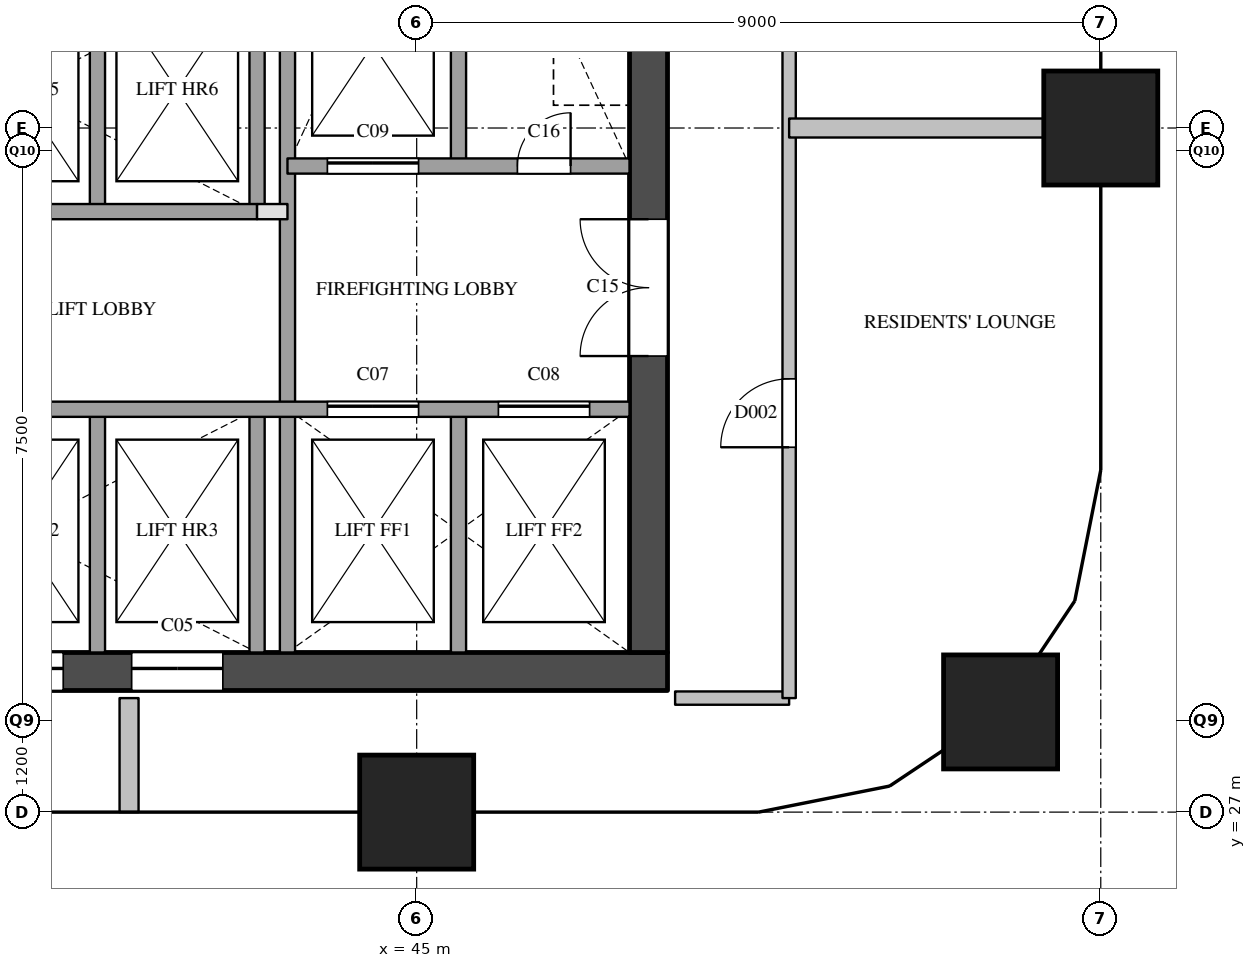
"""IFC4 building model, lengths in metres.
Left out: names, types, materials, properties, quantities, classifications, styles, units other than length and angle.
Written with IfcOpenShell. Run it as: python <this file> out.ifc"""

import sys

from ifc_helpers import new_model, si_unit, direction, frame, frame_2d, origin, origin_2d, place, context, subcontext, project, spatial, rectangle, extrude, element, fill, save


model = new_model("IFC4")
c1 = context("Model", 3, precision=1e-05, world=origin(), true_north=direction((0.0, 1.0)))
c2 = subcontext(c1, "Body", "Model", "MODEL_VIEW")
j1 = project(units=[si_unit("LENGTHUNIT", "METRE"), si_unit("PLANEANGLEUNIT", "RADIAN")], contexts=[c1])
p1 = place(None, origin())
s1 = spatial("IfcSite", under=j1, at=p1, CompositionType="ELEMENT")
p2 = place(p1, origin())
s2 = spatial("IfcBuilding", under=s1, at=p2, CompositionType="ELEMENT")
p3 = place(p2, frame((0.0, 0.0, 150.5)))
s3 = spatial("IfcBuildingStorey", under=s2, at=p3, CompositionType="ELEMENT", Elevation=150.5)
for number, where, z_axis, x_axis in (
    (1, (45.0, 27.0, 0.0), (0.0, 0.0, 1.0), (1.0, 0.0, 0.0)),
    (2, (52.682, 28.318, 0.0), (0.0, 0.0, 1.0), (1.0, 0.0, 0.0)),
    (3, (54.0, 36.0, 0.0), (0.0, 0.0, 1.0), (1.0, 0.0, 0.0)),
):
    element("IfcColumn", number, at=place(p3, frame(where, z_axis=z_axis, x_axis=x_axis)), inside=s3, PredefinedType="COLUMN", context=c2, shape_type="SweptSolid", body=[
        extrude(rectangle(XDim=1.5, YDim=1.5, at=origin_2d()), origin(), (0.0, 0.0, 1.0), 3.9),
    ])
p4 = place(p3, frame((36.1, 28.85, 0.0), z_axis=(0.0, 0.0, 1.0), x_axis=(1.0, 0.0, 0.0)))
e4 = element("IfcWall", 4, at=p4, inside=s3, PredefinedType="SHEAR", context=c2, shape_type="SweptSolid", body=[
    extrude(rectangle(XDim=12.2, YDim=0.5, at=frame_2d((6.1, 0.0))), origin(), (0.0, 0.0, 1.0), 3.6),
])
p5 = place(p4, frame((0.95, 0.0, 0.0)))
e5 = element("IfcOpeningElement", 5, at=p5, cuts=e4, PredefinedType="OPENING", context=c2, shape_type="SweptSolid", body=[
    extrude(rectangle(XDim=1.2, YDim=2.1, at=frame_2d((0.6, 1.05))), frame((0.0, 0.26, 0.0), z_axis=(0.0, -1.0, 0.0), x_axis=(1.0, 0.0, 0.0)), (0.0, 0.0, 1.0), 0.52),
])
p6 = place(p4, frame((3.05, 0.0, 0.0)))
e6 = element("IfcOpeningElement", 6, at=p6, cuts=e4, PredefinedType="OPENING", context=c2, shape_type="SweptSolid", body=[
    extrude(rectangle(XDim=1.2, YDim=2.1, at=frame_2d((0.6, 1.05))), frame((0.0, 0.26, 0.0), z_axis=(0.0, -1.0, 0.0), x_axis=(1.0, 0.0, 0.0)), (0.0, 0.0, 1.0), 0.52),
])
p7 = place(p4, frame((5.15, 0.0, 0.0)))
e7 = element("IfcOpeningElement", 7, at=p7, cuts=e4, PredefinedType="OPENING", context=c2, shape_type="SweptSolid", body=[
    extrude(rectangle(XDim=1.2, YDim=2.1, at=frame_2d((0.6, 1.05))), frame((0.0, 0.26, 0.0), z_axis=(0.0, -1.0, 0.0), x_axis=(1.0, 0.0, 0.0)), (0.0, 0.0, 1.0), 0.52),
])
p8 = place(p3, frame((48.05, 29.1, 0.0), z_axis=(0.0, 0.0, 1.0), x_axis=(0.0, 1.0, 0.0)))
e8 = element("IfcWall", 8, at=p8, inside=s3, PredefinedType="SHEAR", context=c2, shape_type="SweptSolid", body=[
    extrude(rectangle(XDim=20.3, YDim=0.5, at=frame_2d((10.15, 0.0))), origin(), (0.0, 0.0, 1.0), 3.6),
])
p9 = place(p8, frame((12.5, 0.0, 0.0)))
e9 = element("IfcOpeningElement", 9, at=p9, cuts=e8, PredefinedType="OPENING", context=c2, shape_type="SweptSolid", body=[
    extrude(rectangle(XDim=0.7, YDim=2.1, at=frame_2d((0.35, 1.05))), frame((0.0, 0.26, 0.0), z_axis=(0.0, -1.0, 0.0), x_axis=(1.0, 0.0, 0.0)), (0.0, 0.0, 1.0), 0.52),
])
p10 = place(p8, frame((3.9, 0.0, 0.0)))
e10 = element("IfcOpeningElement", 10, at=p10, cuts=e8, PredefinedType="OPENING", context=c2, shape_type="SweptSolid", body=[
    extrude(rectangle(XDim=1.8, YDim=2.1, at=frame_2d((0.9, 1.05))), frame((0.0, 0.26, 0.0), z_axis=(0.0, -1.0, 0.0), x_axis=(1.0, 0.0, 0.0)), (0.0, 0.0, 1.0), 0.52),
])
p11 = place(p3, frame((40.8, 29.1, 0.0), z_axis=(0.0, 0.0, 1.0), x_axis=(0.0, 1.0, 0.0)))
e11 = element("IfcWall", 11, at=p11, inside=s3, PredefinedType="SOLIDWALL", context=c2, shape_type="SweptSolid", body=[
    extrude(rectangle(XDim=3.2, YDim=0.2, at=frame_2d((1.6, 0.0))), origin(), (0.0, 0.0, 1.0), 3.6),
])
p12 = place(p3, frame((40.8, 34.9, 0.0), z_axis=(0.0, 0.0, 1.0), x_axis=(0.0, 1.0, 0.0)))
e12 = element("IfcWall", 12, at=p12, inside=s3, PredefinedType="SOLIDWALL", context=c2, shape_type="SweptSolid", body=[
    extrude(rectangle(XDim=3.2, YDim=0.2, at=frame_2d((1.6, 0.0))), origin(), (0.0, 0.0, 1.0), 3.6),
])
p13 = place(p3, frame((42.9, 29.1, 0.0), z_axis=(0.0, 0.0, 1.0), x_axis=(0.0, 1.0, 0.0)))
e13 = element("IfcWall", 13, at=p13, inside=s3, PredefinedType="SOLIDWALL", context=c2, shape_type="SweptSolid", body=[
    extrude(rectangle(XDim=3.2, YDim=0.2, at=frame_2d((1.6, 0.0))), origin(), (0.0, 0.0, 1.0), 3.6),
])
p14 = place(p3, frame((42.9, 34.9, 0.0), z_axis=(0.0, 0.0, 1.0), x_axis=(0.0, 1.0, 0.0)))
e14 = element("IfcWall", 14, at=p14, inside=s3, PredefinedType="SOLIDWALL", context=c2, shape_type="SweptSolid", body=[
    extrude(rectangle(XDim=3.2, YDim=0.2, at=frame_2d((1.6, 0.0))), origin(), (0.0, 0.0, 1.0), 3.6),
])
p15 = place(p3, frame((43.3, 29.1, 0.0), z_axis=(0.0, 0.0, 1.0), x_axis=(0.0, 1.0, 0.0)))
e15 = element("IfcWall", 15, at=p15, inside=s3, PredefinedType="SOLIDWALL", context=c2, shape_type="SweptSolid", body=[
    extrude(rectangle(XDim=9.9, YDim=0.2, at=frame_2d((4.95, 0.0))), origin(), (0.0, 0.0, 1.0), 3.6),
])
for number, where, z_axis, x_axis in (
    (16, (45.55, 29.1, 0.0), (0.0, 0.0, 1.0), (0.0, 1.0, 0.0)),
    (17, (45.55, 35.5, 0.0), (0.0, 0.0, 1.0), (0.0, 1.0, 0.0)),
):
    element("IfcWall", number, at=place(p3, frame(where, z_axis=z_axis, x_axis=x_axis)), inside=s3, PredefinedType="SOLIDWALL", context=c2, shape_type="SweptSolid", body=[
        extrude(rectangle(XDim=3.2, YDim=0.2, at=frame_2d((1.6, 0.0))), origin(), (0.0, 0.0, 1.0), 3.6),
    ])
p16 = place(p3, frame((36.6, 32.3, 0.0), z_axis=(0.0, 0.0, 1.0), x_axis=(1.0, 0.0, 0.0)))
e18 = element("IfcWall", 18, at=p16, inside=s3, PredefinedType="SOLIDWALL", context=c2, shape_type="SweptSolid", body=[
    extrude(rectangle(XDim=11.2, YDim=0.2, at=frame_2d((5.6, 0.0))), origin(), (0.0, 0.0, 1.0), 3.6),
])
p17 = place(p16, frame((7.225, 0.0, 0.0)))
e19 = element("IfcOpeningElement", 19, at=p17, cuts=e18, PredefinedType="OPENING", context=c2, shape_type="SweptSolid", body=[
    extrude(rectangle(XDim=1.2, YDim=2.1, at=frame_2d((0.6, 1.05))), frame((0.0, 0.11, 0.0), z_axis=(0.0, -1.0, 0.0), x_axis=(1.0, 0.0, 0.0)), (0.0, 0.0, 1.0), 0.22),
])
p18 = place(p16, frame((9.475, 0.0, 0.0)))
e20 = element("IfcOpeningElement", 20, at=p18, cuts=e18, PredefinedType="OPENING", context=c2, shape_type="SweptSolid", body=[
    extrude(rectangle(XDim=1.2, YDim=2.1, at=frame_2d((0.6, 1.05))), frame((0.0, 0.11, 0.0), z_axis=(0.0, -1.0, 0.0), x_axis=(1.0, 0.0, 0.0)), (0.0, 0.0, 1.0), 0.22),
])
p19 = place(p3, frame((42.9, 34.9, 0.0), z_axis=(0.0, 0.0, 1.0), x_axis=(1.0, 0.0, 0.0)))
e21 = element("IfcWall", 21, at=p19, inside=s3, PredefinedType="PARTITIONING", context=c2, shape_type="SweptSolid", body=[
    extrude(rectangle(XDim=0.4, YDim=0.2, at=frame_2d((0.2, 0.0))), origin(), (0.0, 0.0, 1.0), 3.6),
])
p20 = place(p3, frame((36.6, 34.9, 0.0), z_axis=(0.0, 0.0, 1.0), x_axis=(1.0, 0.0, 0.0)))
e22 = element("IfcWall", 22, at=p20, inside=s3, PredefinedType="SOLIDWALL", context=c2, shape_type="SweptSolid", body=[
    extrude(rectangle(XDim=6.3, YDim=0.2, at=frame_2d((3.15, 0.0))), origin(), (0.0, 0.0, 1.0), 3.6),
])
p21 = place(p3, frame((43.3, 35.5, 0.0), z_axis=(0.0, 0.0, 1.0), x_axis=(1.0, 0.0, 0.0)))
e23 = element("IfcWall", 23, at=p21, inside=s3, PredefinedType="SOLIDWALL", context=c2, shape_type="SweptSolid", body=[
    extrude(rectangle(XDim=4.5, YDim=0.2, at=frame_2d((2.25, 0.0))), origin(), (0.0, 0.0, 1.0), 3.6),
])
p22 = place(p21, frame((0.525, 0.0, 0.0)))
e24 = element("IfcOpeningElement", 24, at=p22, cuts=e23, PredefinedType="OPENING", context=c2, shape_type="SweptSolid", body=[
    extrude(rectangle(XDim=1.2, YDim=2.1, at=frame_2d((0.6, 1.05))), frame((0.0, 0.11, 0.0), z_axis=(0.0, -1.0, 0.0), x_axis=(1.0, 0.0, 0.0)), (0.0, 0.0, 1.0), 0.22),
])
p23 = place(p21, frame((3.025, 0.0, 0.0)))
e25 = element("IfcOpeningElement", 25, at=p23, cuts=e23, PredefinedType="OPENING", context=c2, shape_type="SweptSolid", body=[
    extrude(rectangle(XDim=0.7, YDim=2.1, at=frame_2d((0.35, 1.05))), frame((0.0, 0.11, 0.0), z_axis=(0.0, -1.0, 0.0), x_axis=(1.0, 0.0, 0.0)), (0.0, 0.0, 1.0), 0.22),
])
p24 = place(p3, frame((48.4, 28.5, 0.0), z_axis=(0.0, 0.0, 1.0), x_axis=(1.0, 0.0, 0.0)))
e26 = element("IfcWall", 26, at=p24, inside=s3, PredefinedType="PARTITIONING", context=c2, shape_type="SweptSolid", body=[
    extrude(rectangle(XDim=1.5, YDim=0.175, at=frame_2d((0.75, 0.0))), origin(), (0.0, 0.0, 1.0), 3.6),
])
p25 = place(p3, frame((49.9, 28.5, 0.0), z_axis=(0.0, 0.0, 1.0), x_axis=(0.0, 1.0, 0.0)))
e27 = element("IfcWall", 27, at=p25, inside=s3, PredefinedType="PARTITIONING", context=c2, shape_type="SweptSolid", body=[
    extrude(rectangle(XDim=23.0, YDim=0.175, at=frame_2d((11.5, 0.0))), origin(), (0.0, 0.0, 1.0), 3.6),
])
p26 = place(p25, frame((3.3, 0.0, 0.0)))
e28 = element("IfcOpeningElement", 28, at=p26, cuts=e27, PredefinedType="OPENING", context=c2, shape_type="SweptSolid", body=[
    extrude(rectangle(XDim=0.9, YDim=2.1, at=frame_2d((0.45, 1.05))), frame((0.0, 0.097, 0.0), z_axis=(0.0, -1.0, 0.0), x_axis=(1.0, 0.0, 0.0)), (0.0, 0.0, 1.0), 0.195),
])
p27 = place(p25, frame((14.8, 0.0, 0.0)))
e29 = element("IfcOpeningElement", 29, at=p27, cuts=e27, PredefinedType="OPENING", context=c2, shape_type="SweptSolid", body=[
    extrude(rectangle(XDim=0.9, YDim=2.1, at=frame_2d((0.45, 1.05))), frame((0.0, 0.097, 0.0), z_axis=(0.0, -1.0, 0.0), x_axis=(1.0, 0.0, 0.0)), (0.0, 0.0, 1.0), 0.195),
])
p28 = place(p3, frame((49.9, 36.0, 0.0), z_axis=(0.0, 0.0, 1.0), x_axis=(1.0, 0.0, 0.0)))
e30 = element("IfcWall", 30, at=p28, inside=s3, PredefinedType="PARTITIONING", context=c2, shape_type="SweptSolid", body=[
    extrude(rectangle(XDim=4.1, YDim=0.25, at=frame_2d((2.05, 0.0))), origin(), (0.0, 0.0, 1.0), 3.6),
])
p29 = place(p3, frame((41.216, 27.0, 0.0), z_axis=(0.0, 0.0, 1.0), x_axis=(0.0, 1.0, 0.0)))
e31 = element("IfcWall", 31, at=p29, inside=s3, PredefinedType="PARTITIONING", context=c2, shape_type="SweptSolid", body=[
    extrude(rectangle(XDim=1.5, YDim=0.25, at=frame_2d((0.75, 0.0))), origin(), (0.0, 0.0, 1.0), 2.6),
])
p30 = place(p6, origin())
e32 = element("IfcDoor", 32, at=p30, inside=s3, OperationType="SLIDING_TO_LEFT", PredefinedType="DOOR", context=c2, shape_type="SweptSolid", body=[
    extrude(rectangle(XDim=1.2, YDim=2.1, at=frame_2d((0.6, 1.05))), frame((0.0, 0.025, 0.0), z_axis=(0.0, -1.0, 0.0), x_axis=(1.0, 0.0, 0.0)), (0.0, 0.0, 1.0), 0.05),
])
fill(e6, e32)
p31 = place(p7, origin())
e33 = element("IfcDoor", 33, at=p31, inside=s3, OperationType="SLIDING_TO_LEFT", PredefinedType="DOOR", context=c2, shape_type="SweptSolid", body=[
    extrude(rectangle(XDim=1.2, YDim=2.1, at=frame_2d((0.6, 1.05))), frame((0.0, 0.025, 0.0), z_axis=(0.0, -1.0, 0.0), x_axis=(1.0, 0.0, 0.0)), (0.0, 0.0, 1.0), 0.05),
])
fill(e7, e33)
p32 = place(p17, origin())
e34 = element("IfcDoor", 34, at=p32, inside=s3, OperationType="SLIDING_TO_LEFT", PredefinedType="DOOR", context=c2, shape_type="SweptSolid", body=[
    extrude(rectangle(XDim=1.2, YDim=2.1, at=frame_2d((0.6, 1.05))), frame((0.0, 0.025, 0.0), z_axis=(0.0, -1.0, 0.0), x_axis=(1.0, 0.0, 0.0)), (0.0, 0.0, 1.0), 0.05),
])
fill(e19, e34)
p33 = place(p18, origin())
e35 = element("IfcDoor", 35, at=p33, inside=s3, OperationType="SLIDING_TO_LEFT", PredefinedType="DOOR", context=c2, shape_type="SweptSolid", body=[
    extrude(rectangle(XDim=1.2, YDim=2.1, at=frame_2d((0.6, 1.05))), frame((0.0, 0.025, 0.0), z_axis=(0.0, -1.0, 0.0), x_axis=(1.0, 0.0, 0.0)), (0.0, 0.0, 1.0), 0.05),
])
fill(e20, e35)
p34 = place(p22, origin())
e36 = element("IfcDoor", 36, at=p34, inside=s3, OperationType="SLIDING_TO_LEFT", PredefinedType="DOOR", context=c2, shape_type="SweptSolid", body=[
    extrude(rectangle(XDim=1.2, YDim=2.1, at=frame_2d((0.6, 1.05))), frame((0.0, 0.025, 0.0), z_axis=(0.0, -1.0, 0.0), x_axis=(1.0, 0.0, 0.0)), (0.0, 0.0, 1.0), 0.05),
])
fill(e24, e36)
p35 = place(p10, origin())
e37 = element("IfcDoor", 37, at=p35, inside=s3, OperationType="DOUBLE_DOOR_SINGLE_SWING", PredefinedType="DOOR", context=c2, shape_type="SweptSolid", body=[
    extrude(rectangle(XDim=1.8, YDim=2.1, at=frame_2d((0.9, 1.05))), frame((0.0, 0.025, 0.0), z_axis=(0.0, -1.0, 0.0), x_axis=(1.0, 0.0, 0.0)), (0.0, 0.0, 1.0), 0.05),
])
fill(e10, e37)
p36 = place(p23, origin())
e38 = element("IfcDoor", 38, at=p36, inside=s3, OperationType="SINGLE_SWING_RIGHT", PredefinedType="DOOR", context=c2, shape_type="SweptSolid", body=[
    extrude(rectangle(XDim=0.7, YDim=2.1, at=frame_2d((0.35, 1.05))), frame((0.0, 0.025, 0.0), z_axis=(0.0, -1.0, 0.0), x_axis=(1.0, 0.0, 0.0)), (0.0, 0.0, 1.0), 0.05),
])
fill(e25, e38)
p37 = place(p26, origin())
e39 = element("IfcDoor", 39, at=p37, inside=s3, OperationType="SINGLE_SWING_LEFT", PredefinedType="DOOR", context=c2, shape_type="SweptSolid", body=[
    extrude(rectangle(XDim=0.9, YDim=2.1, at=frame_2d((0.45, 1.05))), frame((0.0, 0.025, 0.0), z_axis=(0.0, -1.0, 0.0), x_axis=(1.0, 0.0, 0.0)), (0.0, 0.0, 1.0), 0.05),
])
fill(e28, e39)
save(model, sys.argv[1])
